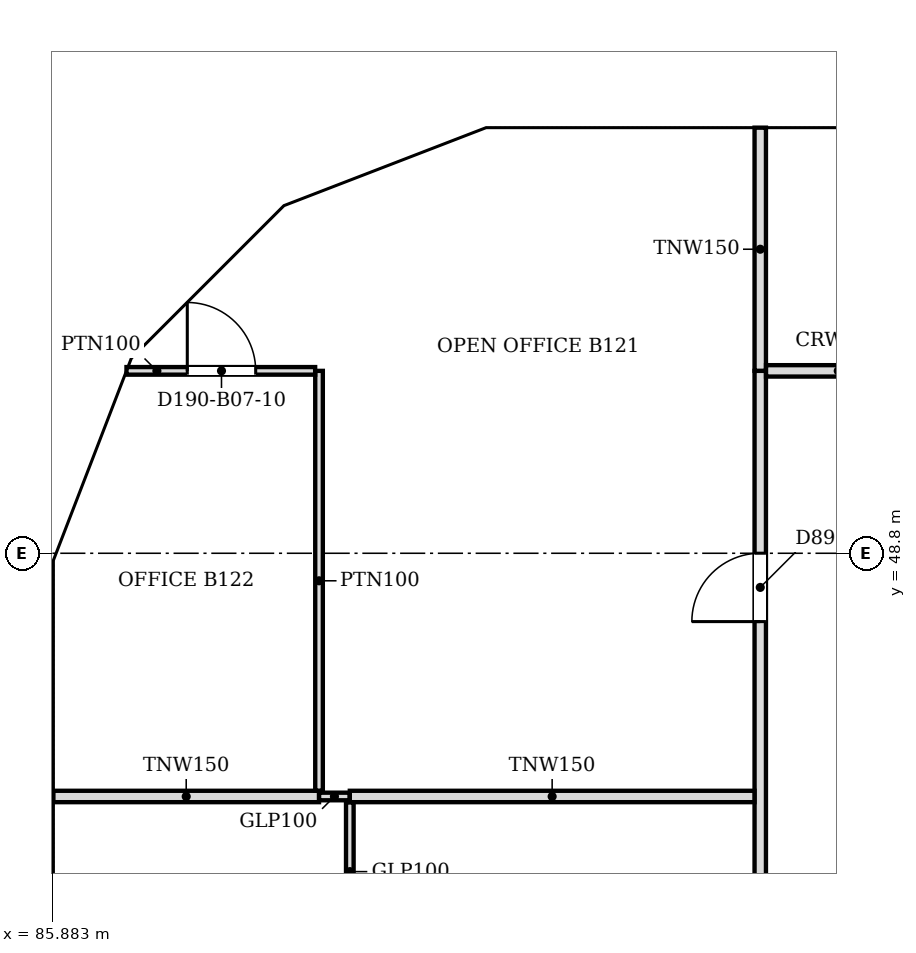
"""IFC4 building model, lengths in metres.
Left out: names, types, materials, properties, quantities, classifications, styles, units other than length and angle.
Written with IfcOpenShell. Run it as: python <this file> out.ifc"""

import sys

from ifc_helpers import new_model, si_unit, direction, frame, frame_2d, origin, place, context, subcontext, project, spatial, polyline, rectangle, outline, extrude, faceted_brep, source, transform, mapped, element, fill, save


model = new_model("IFC4")
c1 = context("Model", 3, precision=1e-05, world=origin(), true_north=direction((0.0, 1.0)))
c2 = subcontext(c1, "Body", "Model", "MODEL_VIEW")
j1 = project(units=[si_unit("LENGTHUNIT", "METRE"), si_unit("PLANEANGLEUNIT", "RADIAN")], contexts=[c1])
p1 = place(None, origin())
s1 = spatial("IfcSite", under=j1, at=p1, CompositionType="ELEMENT")
p2 = place(p1, origin())
s2 = spatial("IfcBuilding", under=s1, at=p2, CompositionType="ELEMENT")
p3 = place(p2, frame((0.0, 0.0, 68.6)))
s3 = spatial("IfcBuildingStorey", under=s2, at=p3, CompositionType="ELEMENT", Elevation=68.6)
m1 = source(origin(), c2, "Body", "Brep", [
    faceted_brep([(6.1, -0.25, 0.0), (3.05, -0.25, 3.8), (0.0, -0.25, 0.0), (6.1, -0.25, 0.0), (0.0, 0.25, 0.0), (3.05, 0.25, 3.8), (6.1, 0.25, 0.0), (6.1, 0.25, 0.0)], [[[0, 1, 2, 3]], [[4, 5, 6, 7]], [[6, 5, 1, 0]], [[5, 4, 2, 1]], [[4, 7, 3, 2]], [[3, 7, 6, 0]]]),
])
p4 = place(p3, frame((100.65, 54.65, 0.0), z_axis=(0.0, 0.0, 1.0), x_axis=(-1.0, 0.0, 0.0)))
e1 = element("IfcWall", 1, at=p4, inside=s3, PredefinedType="SOLIDWALL", context=c2, shape_type="MappedRepresentation", body=[
    mapped(m1, transform((0.0, 0.0, 0.0), scale=1.0)),
])
m2 = source(origin(), c2, "Body", "SweptSolid", [
    extrude(outline(polyline([(5.579, 0.25), (3.05, 3.4), (0.521, 0.25), (5.579, 0.25)])), frame((0.0, 0.26, 0.0), z_axis=(0.0, -1.0, 0.0), x_axis=(1.0, 0.0, 0.0)), (0.0, 0.0, 1.0), 0.52),
])
p5 = place(p4, origin())
e2 = element("IfcOpeningElement", 2, at=p5, cuts=e1, PredefinedType="OPENING", context=c2, shape_type="MappedRepresentation", body=[
    mapped(m2, transform((0.0, 0.0, 0.0), scale=1.0)),
])
m3 = source(origin(), c2, "Body", "Brep", [
    faceted_brep([(3.05, -0.25, 3.74), (3.003, -0.25, 3.8), (0.0, -0.25, 0.0), (3.05, -0.25, 0.0), (0.0, 0.25, 0.0), (2.957, 0.25, 3.741), (2.957, 0.25, 0.0), (3.003, 0.0, 3.8)], [[[0, 1, 2, 3]], [[4, 5, 6]], [[7, 1, 0]], [[5, 4, 2, 1, 7]], [[4, 6, 3, 2]], [[3, 6, 5, 7, 0]]]),
])
p6 = place(p3, frame((94.55, 54.65, 0.0), z_axis=(0.0, 0.0, 1.0), x_axis=(-1.0, 0.0, 0.0)))
e3 = element("IfcWall", 3, at=p6, inside=s3, PredefinedType="SOLIDWALL", context=c2, shape_type="MappedRepresentation", body=[
    mapped(m3, transform((0.0, 0.0, 0.0), scale=1.0)),
])
m4 = source(origin(), c2, "Body", "SweptSolid", [
    extrude(outline(polyline([(2.803, 3.144), (0.516, 0.25), (2.803, 0.25), (2.803, 3.144)])), frame((0.0, 0.26, 0.0), z_axis=(0.0, -1.0, 0.0), x_axis=(1.0, 0.0, 0.0)), (0.0, 0.0, 1.0), 0.52),
])
p7 = place(p6, origin())
e4 = element("IfcOpeningElement", 4, at=p7, cuts=e3, PredefinedType="OPENING", context=c2, shape_type="MappedRepresentation", body=[
    mapped(m4, transform((0.0, 0.0, 0.0), scale=1.0)),
])
m5 = source(origin(), c2, "Body", "Brep", [
    faceted_brep([(2.997, -0.25, 0.0), (0.047, -0.25, 3.8), (0.0, -0.25, 3.741), (0.0, -0.25, 0.0), (0.093, 0.25, 3.74), (2.944, 0.25, 0.068), (2.944, 0.25, 0.0), (0.093, 0.25, 0.0), (0.047, 0.0, 3.8), (2.997, 0.0, 0.0)], [[[0, 1, 2, 3]], [[4, 5, 6, 7]], [[5, 4, 8, 1, 0, 9]], [[2, 1, 8]], [[7, 6, 9, 0, 3]], [[7, 3, 2, 8, 4]], [[9, 6, 5]]]),
])
p8 = place(p3, frame((91.59, 54.667, 0.0), z_axis=(0.0, 0.0, 1.0), x_axis=(-0.933000876937, -0.359874094142, 0.0)))
e5 = element("IfcWall", 5, at=p8, inside=s3, PredefinedType="SOLIDWALL", context=c2, shape_type="MappedRepresentation", body=[
    mapped(m5, transform((0.0, 0.0, 0.0), scale=1.0)),
])
m6 = source(origin(), c2, "Body", "SweptSolid", [
    extrude(outline(polyline([(2.487, 0.25), (0.247, 3.135), (0.247, 0.25), (2.487, 0.25)])), frame((0.0, 0.26, 0.0), z_axis=(0.0, -1.0, 0.0), x_axis=(1.0, 0.0, 0.0)), (0.0, 0.0, 1.0), 0.52),
])
p9 = place(p8, origin())
e6 = element("IfcOpeningElement", 6, at=p9, cuts=e5, PredefinedType="OPENING", context=c2, shape_type="MappedRepresentation", body=[
    mapped(m6, transform((0.0, 0.0, 0.0), scale=1.0)),
])
m7 = source(origin(), c2, "Body", "Brep", [
    faceted_brep([(2.997, -0.25, 3.732), (2.944, -0.25, 3.8), (0.0, -0.25, 0.0), (2.997, -0.25, 0.0), (0.053, 0.25, 0.068), (2.891, 0.25, 3.732), (2.891, 0.25, 0.0), (0.053, 0.25, 0.0), (2.944, 0.0, 3.8), (0.0, 0.0, 0.0)], [[[0, 1, 2, 3]], [[4, 5, 6, 7]], [[8, 1, 0]], [[5, 4, 9, 2, 1, 8]], [[7, 6, 3, 2, 9]], [[7, 9, 4]], [[3, 6, 5, 8, 0]]]),
])
p10 = place(p3, frame((88.794, 53.588, 0.0), z_axis=(0.0, 0.0, 1.0), x_axis=(-0.707066050402, -0.707147509625, 0.0)))
e7 = element("IfcWall", 7, at=p10, inside=s3, PredefinedType="SOLIDWALL", context=c2, shape_type="MappedRepresentation", body=[
    mapped(m7, transform((0.0, 0.0, 0.0), scale=1.0)),
])
m8 = source(origin(), c2, "Body", "SweptSolid", [
    extrude(outline(polyline([(2.744, 3.134), (0.51, 0.25), (2.744, 0.25), (2.744, 3.134)])), frame((0.0, 0.26, 0.0), z_axis=(0.0, -1.0, 0.0), x_axis=(1.0, 0.0, 0.0)), (0.0, 0.0, 1.0), 0.52),
])
p11 = place(p10, origin())
e8 = element("IfcOpeningElement", 8, at=p11, cuts=e7, PredefinedType="OPENING", context=c2, shape_type="MappedRepresentation", body=[
    mapped(m8, transform((0.0, 0.0, 0.0), scale=1.0)),
])
m9 = source(origin(), c2, "Body", "Brep", [
    faceted_brep([(3.003, -0.25, 0.0), (0.053, -0.25, 3.8), (0.0, -0.25, 3.731), (0.0, -0.25, 0.0), (0.106, 0.25, 3.732), (2.957, 0.25, 0.06), (2.957, 0.25, 0.0), (0.106, 0.25, 0.0), (0.053, 0.0, 3.8), (3.003, 0.0, 0.0)], [[[0, 1, 2, 3]], [[4, 5, 6, 7]], [[5, 4, 8, 1, 0, 9]], [[2, 1, 8]], [[7, 6, 9, 0, 3]], [[7, 3, 2, 8, 4]], [[9, 6, 5]]]),
])
p12 = place(p3, frame((86.731, 51.556, 0.0), z_axis=(0.0, 0.0, 1.0), x_axis=(-0.359855894603, -0.933007896601, 0.0)))
e9 = element("IfcWall", 9, at=p12, inside=s3, PredefinedType="SOLIDWALL", context=c2, shape_type="MappedRepresentation", body=[
    mapped(m9, transform((0.0, 0.0, 0.0), scale=1.0)),
])
m10 = source(origin(), c2, "Body", "SweptSolid", [
    extrude(outline(polyline([(2.493, 0.25), (0.253, 3.135), (0.253, 0.25), (2.493, 0.25)])), frame((0.0, 0.26, 0.0), z_axis=(0.0, -1.0, 0.0), x_axis=(1.0, 0.0, 0.0)), (0.0, 0.0, 1.0), 0.52),
])
p13 = place(p12, origin())
e10 = element("IfcOpeningElement", 10, at=p13, cuts=e9, PredefinedType="OPENING", context=c2, shape_type="MappedRepresentation", body=[
    mapped(m10, transform((0.0, 0.0, 0.0), scale=1.0)),
])
m11 = source(origin(), c2, "Body", "Brep", [
    faceted_brep([(6.053, -0.25, 0.0), (3.003, -0.25, 3.8), (0.0, -0.25, 0.0), (0.047, 0.25, 0.059), (3.003, 0.25, 3.8), (6.053, 0.25, 0.0), (0.047, 0.25, 0.0), (0.0, 0.0, 0.0)], [[[0, 1, 2]], [[3, 4, 5, 6]], [[5, 4, 1, 0]], [[4, 3, 7, 2, 1]], [[6, 5, 0, 2, 7]], [[6, 7, 3]]]),
])
p14 = place(p3, frame((85.65, 48.753, 0.0), z_axis=(0.0, 0.0, 1.0), x_axis=(0.0, -1.0, 0.0)))
e11 = element("IfcWall", 11, at=p14, inside=s3, PredefinedType="SOLIDWALL", context=c2, shape_type="MappedRepresentation", body=[
    mapped(m11, transform((0.0, 0.0, 0.0), scale=1.0)),
])
m12 = source(origin(), c2, "Body", "SweptSolid", [
    extrude(outline(polyline([(5.532, 0.25), (3.005, 3.399), (0.516, 0.25), (5.532, 0.25)])), frame((0.0, 0.26, 0.0), z_axis=(0.0, -1.0, 0.0), x_axis=(1.0, 0.0, 0.0)), (0.0, 0.0, 1.0), 0.52),
])
p15 = place(p14, origin())
e12 = element("IfcOpeningElement", 12, at=p15, cuts=e11, PredefinedType="OPENING", context=c2, shape_type="MappedRepresentation", body=[
    mapped(m12, transform((0.0, 0.0, 0.0), scale=1.0)),
])
p16 = place(p2, frame((0.0, 0.0, 72.4)))
s4 = spatial("IfcBuildingStorey", under=s2, at=p16, CompositionType="ELEMENT", Elevation=72.4)
m13 = source(origin(), c2, "Body", "Brep", [
    faceted_brep([(3.05, -0.25, 0.0), (6.053, -0.25, 3.8), (3.05, -0.25, 7.6), (0.0, -0.25, 3.8), (0.0, 0.25, 3.8), (3.05, 0.25, 7.6), (6.007, 0.25, 3.859), (6.007, 0.25, 3.741), (3.05, 0.25, 0.0), (6.053, 0.0, 3.8)], [[[0, 1, 2, 3]], [[4, 5, 6, 7, 8]], [[8, 7, 9, 1, 0]], [[6, 5, 2, 1, 9]], [[5, 4, 3, 2]], [[4, 8, 0, 3]], [[9, 7, 6]]]),
])
p17 = place(p16, frame((97.6, 54.65, -3.8), z_axis=(0.0, 0.0, 1.0), x_axis=(-1.0, 0.0, 0.0)))
e13 = element("IfcWall", 13, at=p17, inside=s4, PredefinedType="SOLIDWALL", context=c2, shape_type="MappedRepresentation", body=[
    mapped(m13, transform((0.0, 0.0, 0.0), scale=1.0)),
])
m14 = source(origin(), c2, "Body", "SweptSolid", [
    extrude(outline(polyline([(3.049, 0.401), (5.735, 3.8), (3.049, 7.199), (0.321, 3.8), (3.049, 0.401)])), frame((0.0, 0.26, 0.0), z_axis=(0.0, -1.0, 0.0), x_axis=(1.0, 0.0, 0.0)), (0.0, 0.0, 1.0), 0.52),
])
p18 = place(p17, origin())
e14 = element("IfcOpeningElement", 14, at=p18, cuts=e13, PredefinedType="OPENING", context=c2, shape_type="MappedRepresentation", body=[
    mapped(m14, transform((0.0, 0.0, 0.0), scale=1.0)),
])
m15 = source(origin(), c2, "Body", "Brep", [
    faceted_brep([(2.95, -0.25, 0.0), (3.003, -0.25, 0.068), (3.003, -0.25, 7.531), (2.95, -0.25, 7.6), (0.0, -0.25, 3.8), (0.047, 0.25, 3.86), (2.898, 0.25, 7.532), (2.898, 0.25, 0.068), (0.047, 0.25, 3.74), (2.95, 0.0, 0.0), (2.95, 0.0, 7.6), (0.0, 0.0, 3.8)], [[[0, 1, 2, 3, 4]], [[5, 6, 7, 8]], [[1, 0, 9]], [[10, 3, 2]], [[6, 5, 11, 4, 3, 10]], [[8, 7, 9, 0, 4, 11]], [[8, 11, 5]], [[1, 9, 7, 6, 10, 2]]]),
])
p19 = place(p16, frame((91.547, 54.65, -3.8), z_axis=(0.0, 0.0, 1.0), x_axis=(-0.933007896601, -0.359855894603, 0.0)))
e15 = element("IfcWall", 15, at=p19, inside=s4, PredefinedType="SOLIDWALL", context=c2, shape_type="MappedRepresentation", body=[
    mapped(m15, transform((0.0, 0.0, 0.0), scale=1.0)),
])
m16 = source(origin(), c2, "Body", "SweptSolid", [
    extrude(outline(polyline([(2.75, 6.935), (0.316, 3.8), (2.75, 0.665), (2.75, 6.935)])), frame((0.0, 0.26, 0.0), z_axis=(0.0, -1.0, 0.0), x_axis=(1.0, 0.0, 0.0)), (0.0, 0.0, 1.0), 0.52),
])
p20 = place(p19, origin())
e16 = element("IfcOpeningElement", 16, at=p20, cuts=e15, PredefinedType="OPENING", context=c2, shape_type="MappedRepresentation", body=[
    mapped(m16, transform((0.0, 0.0, 0.0), scale=1.0)),
])
m17 = source(origin(), c2, "Body", "Brep", [
    faceted_brep([(0.053, -0.25, 0.0), (2.997, -0.25, 3.8), (0.053, -0.25, 7.6), (0.0, -0.25, 7.532), (0.0, -0.25, 0.068), (0.106, 0.25, 7.531), (2.944, 0.25, 3.868), (2.944, 0.25, 3.732), (0.106, 0.25, 0.068), (2.997, 0.0, 3.8), (0.053, 0.0, 0.0), (0.053, 0.0, 7.6)], [[[0, 1, 2, 3, 4]], [[5, 6, 7, 8]], [[8, 7, 9, 1, 0, 10]], [[6, 5, 11, 2, 1, 9]], [[3, 2, 11]], [[10, 0, 4]], [[8, 10, 4, 3, 11, 5]], [[9, 7, 6]]]),
])
p21 = place(p16, frame((88.831, 53.625, -3.8), z_axis=(0.0, 0.0, 1.0), x_axis=(-0.707147509625, -0.707066050402, 0.0)))
e17 = element("IfcWall", 17, at=p21, inside=s4, PredefinedType="SOLIDWALL", context=c2, shape_type="MappedRepresentation", body=[
    mapped(m17, transform((0.0, 0.0, 0.0), scale=1.0)),
])
m18 = source(origin(), c2, "Body", "SweptSolid", [
    extrude(outline(polyline([(0.253, 0.666), (2.681, 3.8), (0.253, 6.934), (0.253, 0.666)])), frame((0.0, 0.26, 0.0), z_axis=(0.0, -1.0, 0.0), x_axis=(1.0, 0.0, 0.0)), (0.0, 0.0, 1.0), 0.52),
])
p22 = place(p21, origin())
e18 = element("IfcOpeningElement", 18, at=p22, cuts=e17, PredefinedType="OPENING", context=c2, shape_type="MappedRepresentation", body=[
    mapped(m18, transform((0.0, 0.0, 0.0), scale=1.0)),
])
m19 = source(origin(), c2, "Body", "Brep", [
    faceted_brep([(2.95, -0.25, 0.0), (2.997, -0.25, 0.059), (2.997, -0.25, 7.541), (2.95, -0.25, 7.6), (0.0, -0.25, 3.8), (0.053, 0.25, 3.868), (2.904, 0.25, 7.54), (2.904, 0.25, 0.06), (0.053, 0.25, 3.732), (2.95, 0.0, 0.0), (2.95, 0.0, 7.6), (0.0, 0.0, 3.8)], [[[0, 1, 2, 3, 4]], [[5, 6, 7, 8]], [[1, 0, 9]], [[10, 3, 2]], [[6, 5, 11, 4, 3, 10]], [[8, 7, 9, 0, 4, 11]], [[8, 11, 5]], [[1, 9, 7, 6, 10, 2]]]),
])
p23 = place(p16, frame((86.712, 51.506, -3.8), z_axis=(0.0, 0.0, 1.0), x_axis=(-0.359874094142, -0.933000876937, 0.0)))
e19 = element("IfcWall", 19, at=p23, inside=s4, PredefinedType="SOLIDWALL", context=c2, shape_type="MappedRepresentation", body=[
    mapped(m19, transform((0.0, 0.0, 0.0), scale=1.0)),
])
p24 = place(p23, origin())
e20 = element("IfcOpeningElement", 20, at=p24, cuts=e19, PredefinedType="OPENING", context=c2, shape_type="MappedRepresentation", body=[
    mapped(m16, transform((0.0, 0.0, 0.0), scale=1.0)),
])
m20 = source(origin(), c2, "Body", "Brep", [
    faceted_brep([(0.047, -0.25, 0.0), (3.05, -0.25, 3.8), (0.047, -0.25, 7.6), (0.0, -0.25, 7.54), (0.0, -0.25, 0.06), (0.093, 0.25, 7.541), (3.05, 0.25, 3.8), (0.093, 0.25, 0.059), (0.047, 0.0, 0.0), (0.047, 0.0, 7.6)], [[[0, 1, 2, 3, 4]], [[5, 6, 7]], [[7, 6, 1, 0, 8]], [[6, 5, 9, 2, 1]], [[3, 2, 9]], [[8, 0, 4]], [[7, 8, 4, 3, 9, 5]]]),
])
p25 = place(p16, frame((85.65, 48.8, -3.8), z_axis=(0.0, 0.0, 1.0), x_axis=(0.0, -1.0, 0.0)))
e21 = element("IfcWall", 21, at=p25, inside=s4, PredefinedType="SOLIDWALL", context=c2, shape_type="MappedRepresentation", body=[
    mapped(m20, transform((0.0, 0.0, 0.0), scale=1.0)),
])
m21 = source(origin(), c2, "Body", "SweptSolid", [
    extrude(outline(polyline([(0.247, 0.656), (2.731, 3.8), (0.247, 6.944), (0.247, 0.656)])), frame((0.0, 0.26, 0.0), z_axis=(0.0, -1.0, 0.0), x_axis=(1.0, 0.0, 0.0)), (0.0, 0.0, 1.0), 0.52),
])
p26 = place(p25, origin())
e22 = element("IfcOpeningElement", 22, at=p26, cuts=e21, PredefinedType="OPENING", context=c2, shape_type="MappedRepresentation", body=[
    mapped(m21, transform((0.0, 0.0, 0.0), scale=1.0)),
])
m22 = source(origin(), c2, "Body", "SweptSolid", [
    extrude(outline(polyline([(3.05, 0.0), (6.1, 3.8), (3.05, 7.6), (0.0, 3.8), (3.05, 0.0)])), frame((0.0, 0.25, 0.0), z_axis=(0.0, -1.0, 0.0), x_axis=(1.0, 0.0, 0.0)), (0.0, 0.0, 1.0), 0.5),
])
p27 = place(p16, frame((85.65, 45.75, -3.8), z_axis=(0.0, 0.0, 1.0), x_axis=(0.0, -1.0, 0.0)))
e23 = element("IfcWall", 23, at=p27, inside=s4, PredefinedType="SOLIDWALL", context=c2, shape_type="MappedRepresentation", body=[
    mapped(m22, transform((0.0, 0.0, 0.0), scale=1.0)),
])
m23 = source(origin(), c2, "Body", "SweptSolid", [
    extrude(outline(polyline([(3.05, 0.399), (5.78, 3.8), (3.05, 7.2), (0.321, 3.8), (3.05, 0.399)])), frame((0.0, 0.26, 0.0), z_axis=(0.0, -1.0, 0.0), x_axis=(1.0, 0.0, 0.0)), (0.0, 0.0, 1.0), 0.52),
])
p28 = place(p27, origin())
e24 = element("IfcOpeningElement", 24, at=p28, cuts=e23, PredefinedType="OPENING", context=c2, shape_type="MappedRepresentation", body=[
    mapped(m23, transform((0.0, 0.0, 0.0), scale=1.0)),
])
p29 = place(p3, frame((95.2, 36.6, 0.0), z_axis=(0.0, 0.0, 1.0), x_axis=(0.0, 1.0, 0.0)))
e25 = element("IfcWall", 25, at=p29, inside=s3, PredefinedType="PARTITIONING", context=c2, shape_type="SweptSolid", body=[
    extrude(rectangle(XDim=14.6, YDim=0.15, at=frame_2d((7.3, 0.0))), origin(), (0.0, 0.0, 1.0), 3.067),
])
m24 = source(origin(), c2, "Body", "SweptSolid", [
    extrude(rectangle(XDim=0.9, YDim=2.1, at=frame_2d((0.45, 1.05))), frame((0.0, 0.085, 0.0), z_axis=(0.0, -1.0, 0.0), x_axis=(1.0, 0.0, 0.0)), (0.0, 0.0, 1.0), 0.17),
])
p30 = place(p29, frame((11.301, 0.0, 0.0)))
e26 = element("IfcOpeningElement", 26, at=p30, cuts=e25, PredefinedType="OPENING", context=c2, shape_type="MappedRepresentation", body=[
    mapped(m24, transform((0.0, 0.0, 0.0), scale=1.0)),
])
p31 = place(p3, frame((89.8, 40.999, 0.0), z_axis=(0.0, 0.0, 1.0), x_axis=(0.0, 1.0, 0.0)))
e27 = element("IfcWall", 27, at=p31, inside=s3, PredefinedType="PARTITIONING", context=c2, shape_type="SweptSolid", body=[
    extrude(rectangle(XDim=4.525, YDim=0.1, at=frame_2d((2.263, 0.0))), origin(), (0.0, 0.0, 1.0), 3.067),
])
m25 = source(origin(), c2, "Body", "SweptSolid", [
    extrude(rectangle(XDim=0.9, YDim=2.1, at=frame_2d((0.45, 1.05))), frame((0.0, 0.06, 0.0), z_axis=(0.0, -1.0, 0.0), x_axis=(1.0, 0.0, 0.0)), (0.0, 0.0, 1.0), 0.12),
])
p32 = place(p31, frame((1.8, 0.0, 0.0)))
e28 = element("IfcOpeningElement", 28, at=p32, cuts=e27, PredefinedType="OPENING", context=c2, shape_type="MappedRepresentation", body=[
    mapped(m25, transform((0.0, 0.0, 0.0), scale=1.0)),
])
p33 = place(p3, frame((85.9, 45.6, 0.0), z_axis=(0.0, 0.0, 1.0), x_axis=(1.0, 0.0, 0.0)))
e29 = element("IfcWall", 29, at=p33, inside=s3, PredefinedType="PARTITIONING", context=c2, shape_type="SweptSolid", body=[
    extrude(rectangle(XDim=3.495, YDim=0.15, at=frame_2d((1.748, 0.0))), origin(), (0.0, 0.0, 1.0), 3.067),
])
p34 = place(p3, frame((89.396, 45.6, 0.0), z_axis=(0.0, 0.0, 1.0), x_axis=(1.0, 0.0, 0.0)))
e30 = element("IfcWall", 30, at=p34, inside=s3, PredefinedType="PARTITIONING", context=c2, shape_type="SweptSolid", body=[
    extrude(rectangle(XDim=0.403, YDim=0.1, at=frame_2d((0.202, 0.0))), origin(), (0.0, 0.0, 1.0), 3.067),
])
p35 = place(p3, frame((89.8, 45.6, 0.0), z_axis=(0.0, 0.0, 1.0), x_axis=(1.0, 0.0, 0.0)))
e31 = element("IfcWall", 31, at=p35, inside=s3, PredefinedType="PARTITIONING", context=c2, shape_type="SweptSolid", body=[
    extrude(rectangle(XDim=5.324, YDim=0.15, at=frame_2d((2.662, 0.0))), origin(), (0.0, 0.0, 1.0), 3.067),
])
p36 = place(p3, frame((89.395, 45.676, 0.0), z_axis=(0.0, 0.0, 1.0), x_axis=(0.0, 1.0, 0.0)))
e32 = element("IfcWall", 32, at=p36, inside=s3, PredefinedType="PARTITIONING", context=c2, shape_type="SweptSolid", body=[
    extrude(rectangle(XDim=5.524, YDim=0.1, at=frame_2d((2.762, 0.0))), origin(), (0.0, 0.0, 1.0), 3.067),
])
p37 = place(p3, frame((89.344, 51.2, 0.0), z_axis=(0.0, 0.0, 1.0), x_axis=(-1.0, 0.0, 0.0)))
e33 = element("IfcWall", 33, at=p37, inside=s3, PredefinedType="PARTITIONING", context=c2, shape_type="SweptSolid", body=[
    extrude(rectangle(XDim=2.482, YDim=0.1, at=frame_2d((1.241, 0.0))), origin(), (0.0, 0.0, 1.0), 3.067),
])
p38 = place(p37, frame((0.782, 0.0, 0.0)))
e34 = element("IfcOpeningElement", 34, at=p38, cuts=e33, PredefinedType="OPENING", context=c2, shape_type="MappedRepresentation", body=[
    mapped(m25, transform((0.0, 0.0, 0.0), scale=1.0)),
])
p39 = place(p3, frame((95.2, 51.201, 0.0), z_axis=(0.0, 0.0, 1.0), x_axis=(0.0, 1.0, 0.0)))
e35 = element("IfcWall", 35, at=p39, inside=s3, PredefinedType="PARTITIONING", context=c2, shape_type="SweptSolid", body=[
    extrude(rectangle(XDim=3.199, YDim=0.15, at=frame_2d((1.6, 0.0))), origin(), (0.0, 0.0, 1.0), 3.067),
])
p40 = place(p3, frame((95.276, 51.2, 0.0), z_axis=(0.0, 0.0, 1.0), x_axis=(1.0, 0.0, 0.0)))
e36 = element("IfcWall", 36, at=p40, inside=s3, PredefinedType="PARTITIONING", context=c2, shape_type="SweptSolid", body=[
    extrude(rectangle(XDim=4.724, YDim=0.15, at=frame_2d((2.362, 0.0))), origin(), (0.0, 0.0, 1.0), 3.067),
])
m26 = source(origin(), c2, "Body", "SweptSolid", [
    extrude(rectangle(XDim=1.0, YDim=2.1, at=frame_2d((0.5, 1.05))), frame((0.0, 0.085, 0.0), z_axis=(0.0, -1.0, 0.0), x_axis=(1.0, 0.0, 0.0)), (0.0, 0.0, 1.0), 0.17),
])
p41 = place(p40, frame((1.9, 0.0, 0.0)))
e37 = element("IfcOpeningElement", 37, at=p41, cuts=e36, PredefinedType="OPENING", context=c2, shape_type="MappedRepresentation", body=[
    mapped(m26, transform((0.0, 0.0, 0.0), scale=1.0)),
])
m27 = source(origin(), c2, "Body", "SweptSolid", [
    extrude(rectangle(XDim=0.9, YDim=2.1, at=frame_2d((0.45, 1.05))), frame((0.0, 0.025, 0.0), z_axis=(0.0, -1.0, 0.0), x_axis=(1.0, 0.0, 0.0)), (0.0, 0.0, 1.0), 0.05),
])
p42 = place(p30, origin())
e38 = element("IfcDoor", 38, at=p42, inside=s3, OperationType="SINGLE_SWING_LEFT", PredefinedType="DOOR", context=c2, shape_type="MappedRepresentation", body=[
    mapped(m27, transform((0.0, 0.0, 0.0), scale=1.0)),
])
fill(e26, e38)
p43 = place(p38, origin())
e39 = element("IfcDoor", 39, at=p43, inside=s3, OperationType="SINGLE_SWING_RIGHT", PredefinedType="DOOR", context=c2, shape_type="MappedRepresentation", body=[
    mapped(m27, transform((0.0, 0.0, 0.0), scale=1.0)),
])
fill(e34, e39)
save(model, sys.argv[1])
